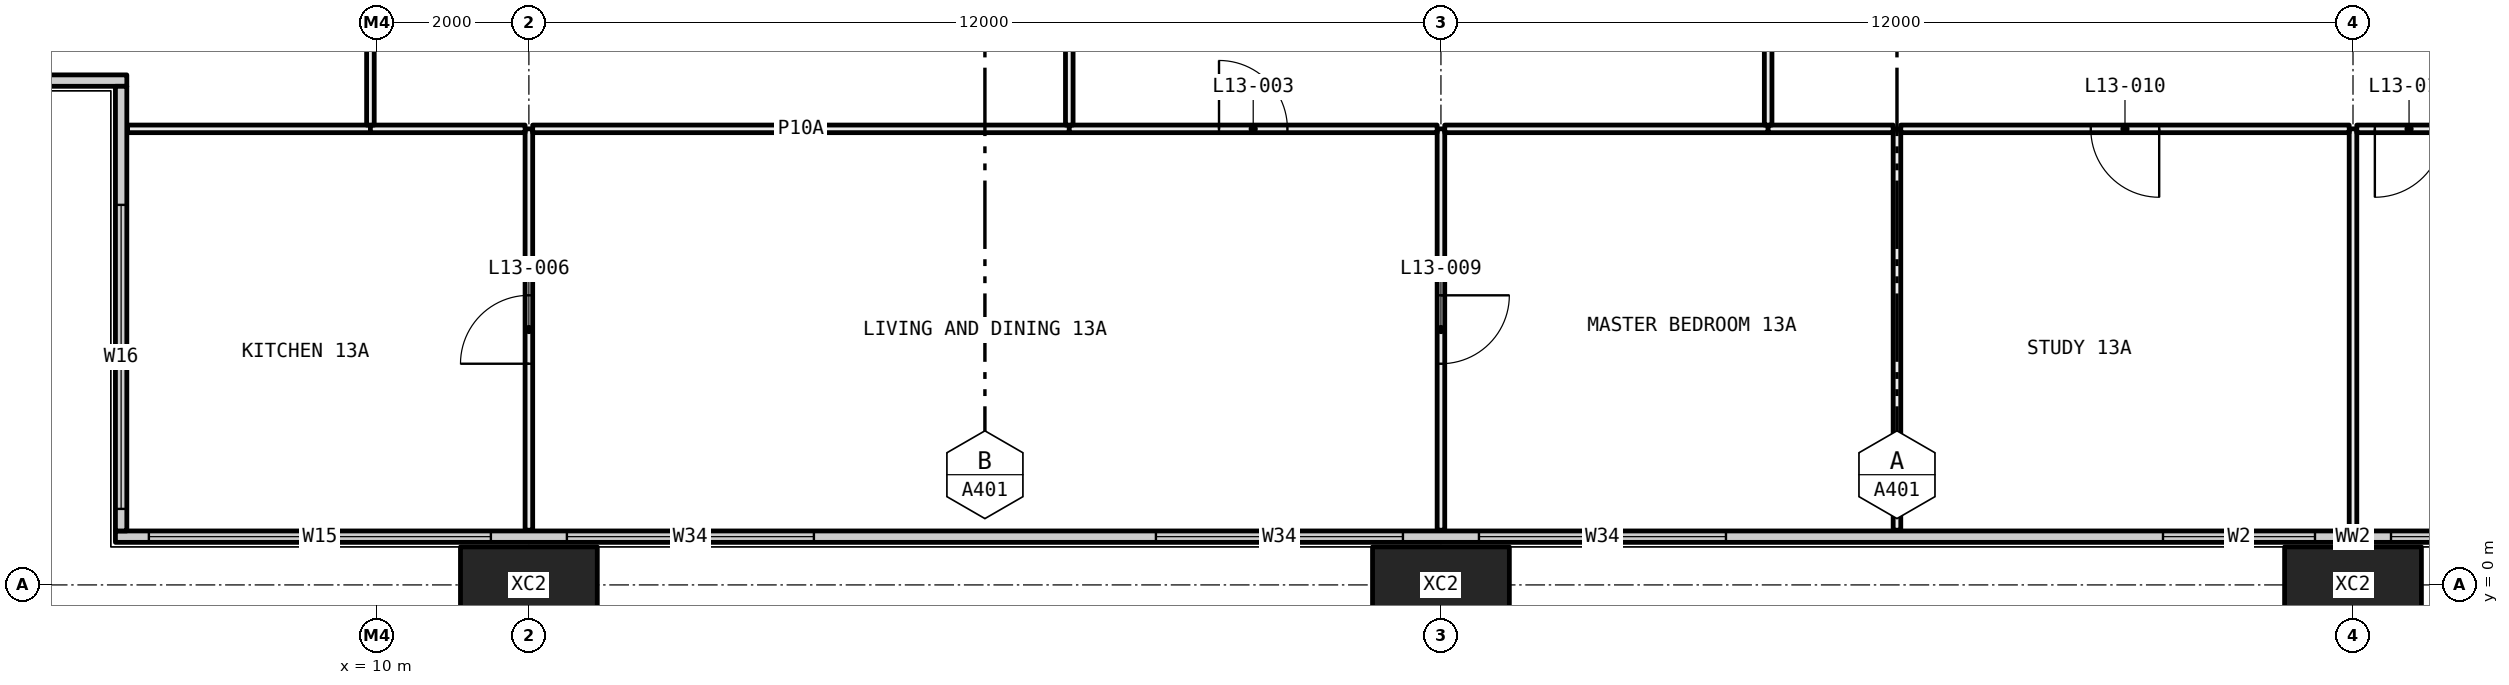
"""IFC4 building model, lengths in metres.
Left out: names, types, materials, properties, quantities, classifications, styles, units other than length and angle.
Written with IfcOpenShell. Run it as: python <this file> out.ifc"""

import sys

from ifc_helpers import new_model, si_unit, direction, frame, frame_2d, origin, origin_2d, place, context, subcontext, project, spatial, rectangle, hollow_rectangle, extrude, element, fill, save


model = new_model("IFC4")
c1 = context("Model", 3, precision=1e-05, world=origin(), true_north=direction((0.0, 1.0)))
c2 = subcontext(c1, "Body", "Model", "MODEL_VIEW")
j1 = project(units=[si_unit("LENGTHUNIT", "METRE"), si_unit("PLANEANGLEUNIT", "RADIAN")], contexts=[c1])
p1 = place(None, origin())
s1 = spatial("IfcSite", under=j1, at=p1, CompositionType="ELEMENT")
p2 = place(p1, origin())
s2 = spatial("IfcBuilding", under=s1, at=p2, CompositionType="ELEMENT")
p3 = place(p2, frame((0.0, 0.0, 57.6)))
s3 = spatial("IfcBuildingStorey", under=s2, at=p3, CompositionType="ELEMENT", Elevation=57.6)
for number, where, z_axis, x_axis in (
    (1, (12.0, 0.0, -0.4), (0.0, 0.0, 1.0), (1.0, 0.0, 0.0)),
    (2, (24.0, 0.0, -0.4), (0.0, 0.0, 1.0), (1.0, 0.0, 0.0)),
    (3, (36.0, 0.0, -0.4), (0.0, 0.0, 1.0), (1.0, 0.0, 0.0)),
):
    element("IfcColumn", number, at=place(p3, frame(where, z_axis=z_axis, x_axis=x_axis)), inside=s3, PredefinedType="COLUMN", context=c2, shape_type="SweptSolid", body=[
        extrude(hollow_rectangle(XDim=1.8, YDim=1.0, WallThickness=0.07, at=origin_2d()), origin(), (0.0, 0.0, 1.0), 3.45),
    ])
p4 = place(p3, frame((6.56, 0.635, 0.0), z_axis=(0.0, 0.0, 1.0), x_axis=(1.0, 0.0, 0.0)))
e4 = element("IfcWall", 4, at=p4, inside=s3, PredefinedType="ELEMENTEDWALL", context=c2, shape_type="SweptSolid", body=[
    extrude(rectangle(XDim=58.88, YDim=0.15, at=frame_2d((29.44, 0.0))), origin(), (0.0, 0.0, 1.0), 3.05),
])
p5 = place(p4, frame((0.44, 0.0, 0.45)))
e5 = element("IfcOpeningElement", 5, at=p5, cuts=e4, PredefinedType="OPENING", context=c2, shape_type="SweptSolid", body=[
    extrude(rectangle(XDim=4.5, YDim=2.55, at=frame_2d((2.25, 1.275))), frame((0.0, 0.085, 0.0), z_axis=(0.0, -1.0, 0.0), x_axis=(1.0, 0.0, 0.0)), (0.0, 0.0, 1.0), 0.17),
])
p6 = place(p4, frame((5.94, 0.0, 0.45)))
e6 = element("IfcOpeningElement", 6, at=p6, cuts=e4, PredefinedType="OPENING", context=c2, shape_type="SweptSolid", body=[
    extrude(rectangle(XDim=3.25, YDim=2.55, at=frame_2d((1.625, 1.275))), frame((0.0, 0.085, 0.0), z_axis=(0.0, -1.0, 0.0), x_axis=(1.0, 0.0, 0.0)), (0.0, 0.0, 1.0), 0.17),
])
p7 = place(p4, frame((13.69, 0.0, 0.45)))
e7 = element("IfcOpeningElement", 7, at=p7, cuts=e4, PredefinedType="OPENING", context=c2, shape_type="SweptSolid", body=[
    extrude(rectangle(XDim=3.25, YDim=2.55, at=frame_2d((1.625, 1.275))), frame((0.0, 0.085, 0.0), z_axis=(0.0, -1.0, 0.0), x_axis=(1.0, 0.0, 0.0)), (0.0, 0.0, 1.0), 0.17),
])
p8 = place(p4, frame((17.94, 0.0, 0.45)))
e8 = element("IfcOpeningElement", 8, at=p8, cuts=e4, PredefinedType="OPENING", context=c2, shape_type="SweptSolid", body=[
    extrude(rectangle(XDim=3.25, YDim=2.55, at=frame_2d((1.625, 1.275))), frame((0.0, 0.085, 0.0), z_axis=(0.0, -1.0, 0.0), x_axis=(1.0, 0.0, 0.0)), (0.0, 0.0, 1.0), 0.17),
])
p9 = place(p4, frame((26.94, 0.0, 0.45)))
e9 = element("IfcOpeningElement", 9, at=p9, cuts=e4, PredefinedType="OPENING", context=c2, shape_type="SweptSolid", body=[
    extrude(rectangle(XDim=2.0, YDim=2.55, at=frame_2d((1.0, 1.275))), frame((0.0, 0.085, 0.0), z_axis=(0.0, -1.0, 0.0), x_axis=(1.0, 0.0, 0.0)), (0.0, 0.0, 1.0), 0.17),
])
p10 = place(p4, frame((29.94, 0.0, 0.45)))
e10 = element("IfcOpeningElement", 10, at=p10, cuts=e4, PredefinedType="OPENING", context=c2, shape_type="SweptSolid", body=[
    extrude(rectangle(XDim=3.25, YDim=2.55, at=frame_2d((1.625, 1.275))), frame((0.0, 0.085, 0.0), z_axis=(0.0, -1.0, 0.0), x_axis=(1.0, 0.0, 0.0)), (0.0, 0.0, 1.0), 0.17),
])
p11 = place(p4, frame((37.69, 0.0, 0.45)))
e11 = element("IfcOpeningElement", 11, at=p11, cuts=e4, PredefinedType="OPENING", context=c2, shape_type="SweptSolid", body=[
    extrude(rectangle(XDim=3.25, YDim=2.55, at=frame_2d((1.625, 1.275))), frame((0.0, 0.085, 0.0), z_axis=(0.0, -1.0, 0.0), x_axis=(1.0, 0.0, 0.0)), (0.0, 0.0, 1.0), 0.17),
])
p12 = place(p4, frame((41.94, 0.0, 0.45)))
e12 = element("IfcOpeningElement", 12, at=p12, cuts=e4, PredefinedType="OPENING", context=c2, shape_type="SweptSolid", body=[
    extrude(rectangle(XDim=3.25, YDim=2.55, at=frame_2d((1.625, 1.275))), frame((0.0, 0.085, 0.0), z_axis=(0.0, -1.0, 0.0), x_axis=(1.0, 0.0, 0.0)), (0.0, 0.0, 1.0), 0.17),
])
p13 = place(p4, frame((50.94, 0.0, 0.45)))
e13 = element("IfcOpeningElement", 13, at=p13, cuts=e4, PredefinedType="OPENING", context=c2, shape_type="SweptSolid", body=[
    extrude(rectangle(XDim=2.0, YDim=2.55, at=frame_2d((1.0, 1.275))), frame((0.0, 0.085, 0.0), z_axis=(0.0, -1.0, 0.0), x_axis=(1.0, 0.0, 0.0)), (0.0, 0.0, 1.0), 0.17),
])
p14 = place(p4, frame((53.94, 0.0, 0.45)))
e14 = element("IfcOpeningElement", 14, at=p14, cuts=e4, PredefinedType="OPENING", context=c2, shape_type="SweptSolid", body=[
    extrude(rectangle(XDim=4.5, YDim=2.55, at=frame_2d((2.25, 1.275))), frame((0.0, 0.085, 0.0), z_axis=(0.0, -1.0, 0.0), x_axis=(1.0, 0.0, 0.0)), (0.0, 0.0, 1.0), 0.17),
])
p15 = place(p3, frame((0.56, 6.635, 0.0), z_axis=(0.0, 0.0, 1.0), x_axis=(1.0, 0.0, 0.0)))
e15 = element("IfcWall", 15, at=p15, inside=s3, PredefinedType="ELEMENTEDWALL", context=c2, shape_type="SweptSolid", body=[
    extrude(rectangle(XDim=6.15, YDim=0.15, at=frame_2d((3.075, 0.0))), origin(), (0.0, 0.0, 1.0), 3.05),
])
p16 = place(p15, frame((0.44, 0.0, 0.45)))
e16 = element("IfcOpeningElement", 16, at=p16, cuts=e15, PredefinedType="OPENING", context=c2, shape_type="SweptSolid", body=[
    extrude(rectangle(XDim=4.0, YDim=2.55, at=frame_2d((2.0, 1.275))), frame((0.0, 0.085, 0.0), z_axis=(0.0, -1.0, 0.0), x_axis=(1.0, 0.0, 0.0)), (0.0, 0.0, 1.0), 0.17),
])
p17 = place(p3, frame((6.635, 0.71, 0.0), z_axis=(0.0, 0.0, 1.0), x_axis=(0.0, 1.0, 0.0)))
e17 = element("IfcWall", 17, at=p17, inside=s3, PredefinedType="ELEMENTEDWALL", context=c2, shape_type="SweptSolid", body=[
    extrude(rectangle(XDim=5.85, YDim=0.15, at=frame_2d((2.925, 0.0))), origin(), (0.0, 0.0, 1.0), 3.05),
])
p18 = place(p17, frame((0.29, 0.0, 0.45)))
e18 = element("IfcOpeningElement", 18, at=p18, cuts=e17, PredefinedType="OPENING", context=c2, shape_type="SweptSolid", body=[
    extrude(rectangle(XDim=4.0, YDim=2.55, at=frame_2d((2.0, 1.275))), frame((0.0, 0.085, 0.0), z_axis=(0.0, -1.0, 0.0), x_axis=(1.0, 0.0, 0.0)), (0.0, 0.0, 1.0), 0.17),
])
p19 = place(p3, frame((12.0, 0.72, 0.0), z_axis=(0.0, 0.0, 1.0), x_axis=(0.0, 1.0, 0.0)))
e19 = element("IfcWall", 19, at=p19, inside=s3, PredefinedType="PARTITIONING", context=c2, shape_type="SweptSolid", body=[
    extrude(rectangle(XDim=5.28, YDim=0.1, at=frame_2d((2.64, 0.0))), origin(), (0.0, 0.0, 1.0), 2.45),
])
p20 = place(p19, frame((2.19, 0.0, 0.0)))
e20 = element("IfcOpeningElement", 20, at=p20, cuts=e19, PredefinedType="OPENING", context=c2, shape_type="SweptSolid", body=[
    extrude(rectangle(XDim=0.9, YDim=2.1, at=frame_2d((0.45, 1.05))), frame((0.0, 0.06, 0.0), z_axis=(0.0, -1.0, 0.0), x_axis=(1.0, 0.0, 0.0)), (0.0, 0.0, 1.0), 0.12),
])
p21 = place(p3, frame((9.915, 6.0, 0.0), z_axis=(0.0, 0.0, 1.0), x_axis=(-1.0, 0.0, 0.0)))
e21 = element("IfcWall", 21, at=p21, inside=s3, PredefinedType="PARTITIONING", context=c2, shape_type="SweptSolid", body=[
    extrude(rectangle(XDim=3.195, YDim=0.1, at=frame_2d((1.598, 0.0))), origin(), (0.0, 0.0, 1.0), 3.05),
])
p22 = place(p3, frame((11.95, 6.0, 0.0), z_axis=(0.0, 0.0, 1.0), x_axis=(-1.0, 0.0, 0.0)))
e22 = element("IfcWall", 22, at=p22, inside=s3, PredefinedType="PARTITIONING", context=c2, shape_type="SweptSolid", body=[
    extrude(rectangle(XDim=2.035, YDim=0.1, at=frame_2d((1.018, 0.0))), origin(), (0.0, 0.0, 1.0), 2.45),
])
p23 = place(p3, frame((24.0, 0.72, 0.0), z_axis=(0.0, 0.0, 1.0), x_axis=(0.0, 1.0, 0.0)))
e23 = element("IfcWall", 23, at=p23, inside=s3, PredefinedType="PARTITIONING", context=c2, shape_type="SweptSolid", body=[
    extrude(rectangle(XDim=5.28, YDim=0.1, at=frame_2d((2.64, 0.0))), origin(), (0.0, 0.0, 1.0), 2.45),
])
p24 = place(p23, frame((2.19, 0.0, 0.0)))
e24 = element("IfcOpeningElement", 24, at=p24, cuts=e23, PredefinedType="OPENING", context=c2, shape_type="SweptSolid", body=[
    extrude(rectangle(XDim=0.9, YDim=2.1, at=frame_2d((0.45, 1.05))), frame((0.0, 0.06, 0.0), z_axis=(0.0, -1.0, 0.0), x_axis=(1.0, 0.0, 0.0)), (0.0, 0.0, 1.0), 0.12),
])
p25 = place(p3, frame((19.11, 6.0, 0.0), z_axis=(0.0, 0.0, 1.0), x_axis=(-1.0, 0.0, 0.0)))
e25 = element("IfcWall", 25, at=p25, inside=s3, PredefinedType="PARTITIONING", context=c2, shape_type="SweptSolid", body=[
    extrude(rectangle(XDim=7.06, YDim=0.1, at=frame_2d((3.53, 0.0))), origin(), (0.0, 0.0, 1.0), 2.45),
])
p26 = place(p3, frame((23.95, 6.0, 0.0), z_axis=(0.0, 0.0, 1.0), x_axis=(-1.0, 0.0, 0.0)))
e26 = element("IfcWall", 26, at=p26, inside=s3, PredefinedType="PARTITIONING", context=c2, shape_type="SweptSolid", body=[
    extrude(rectangle(XDim=4.84, YDim=0.1, at=frame_2d((2.42, 0.0))), origin(), (0.0, 0.0, 1.0), 2.45),
])
p27 = place(p26, frame((1.97, 0.0, 0.0)))
e27 = element("IfcOpeningElement", 27, at=p27, cuts=e26, PredefinedType="OPENING", context=c2, shape_type="SweptSolid", body=[
    extrude(rectangle(XDim=0.9, YDim=2.1, at=frame_2d((0.45, 1.05))), frame((0.0, 0.06, 0.0), z_axis=(0.0, -1.0, 0.0), x_axis=(1.0, 0.0, 0.0)), (0.0, 0.0, 1.0), 0.12),
])
p28 = place(p3, frame((30.0, 0.72, 0.0), z_axis=(0.0, 0.0, 1.0), x_axis=(0.0, 1.0, 0.0)))
e28 = element("IfcWall", 28, at=p28, inside=s3, PredefinedType="PARTITIONING", context=c2, shape_type="SweptSolid", body=[
    extrude(rectangle(XDim=5.28, YDim=0.1, at=frame_2d((2.64, 0.0))), origin(), (0.0, 0.0, 1.0), 3.05),
])
p29 = place(p3, frame((28.305, 6.0, 0.0), z_axis=(0.0, 0.0, 1.0), x_axis=(-1.0, 0.0, 0.0)))
e29 = element("IfcWall", 29, at=p29, inside=s3, PredefinedType="PARTITIONING", context=c2, shape_type="SweptSolid", body=[
    extrude(rectangle(XDim=4.255, YDim=0.1, at=frame_2d((2.127, 0.0))), origin(), (0.0, 0.0, 1.0), 2.45),
])
p30 = place(p3, frame((29.95, 6.0, 0.0), z_axis=(0.0, 0.0, 1.0), x_axis=(-1.0, 0.0, 0.0)))
e30 = element("IfcWall", 30, at=p30, inside=s3, PredefinedType="PARTITIONING", context=c2, shape_type="SweptSolid", body=[
    extrude(rectangle(XDim=1.645, YDim=0.1, at=frame_2d((0.823, 0.0))), origin(), (0.0, 0.0, 1.0), 3.05),
])
p31 = place(p3, frame((36.0, 0.72, 0.0), z_axis=(0.0, 0.0, 1.0), x_axis=(0.0, 1.0, 0.0)))
e31 = element("IfcWall", 31, at=p31, inside=s3, PredefinedType="PARTITIONING", context=c2, shape_type="SweptSolid", body=[
    extrude(rectangle(XDim=5.28, YDim=0.1, at=frame_2d((2.64, 0.0))), origin(), (0.0, 0.0, 1.0), 2.45),
])
p32 = place(p3, frame((35.95, 6.0, 0.0), z_axis=(0.0, 0.0, 1.0), x_axis=(-1.0, 0.0, 0.0)))
e32 = element("IfcWall", 32, at=p32, inside=s3, PredefinedType="PARTITIONING", context=c2, shape_type="SweptSolid", body=[
    extrude(rectangle(XDim=5.9, YDim=0.1, at=frame_2d((2.95, 0.0))), origin(), (0.0, 0.0, 1.0), 2.45),
])
p33 = place(p32, frame((2.5, 0.0, 0.0)))
e33 = element("IfcOpeningElement", 33, at=p33, cuts=e32, PredefinedType="OPENING", context=c2, shape_type="SweptSolid", body=[
    extrude(rectangle(XDim=0.9, YDim=2.1, at=frame_2d((0.45, 1.05))), frame((0.0, 0.06, 0.0), z_axis=(0.0, -1.0, 0.0), x_axis=(1.0, 0.0, 0.0)), (0.0, 0.0, 1.0), 0.12),
])
p34 = place(p3, frame((37.425, 6.0, 0.0), z_axis=(0.0, 0.0, 1.0), x_axis=(-1.0, 0.0, 0.0)))
e34 = element("IfcWall", 34, at=p34, inside=s3, PredefinedType="PARTITIONING", context=c2, shape_type="SweptSolid", body=[
    extrude(rectangle(XDim=1.375, YDim=0.1, at=frame_2d((0.688, 0.0))), origin(), (0.0, 0.0, 1.0), 2.45),
])
p35 = place(p34, frame((0.238, 0.0, 0.0)))
e35 = element("IfcOpeningElement", 35, at=p35, cuts=e34, PredefinedType="OPENING", context=c2, shape_type="SweptSolid", body=[
    extrude(rectangle(XDim=0.9, YDim=2.1, at=frame_2d((0.45, 1.05))), frame((0.0, 0.06, 0.0), z_axis=(0.0, -1.0, 0.0), x_axis=(1.0, 0.0, 0.0)), (0.0, 0.0, 1.0), 0.12),
])
p36 = place(p3, frame((9.915, 6.05, 0.0), z_axis=(0.0, 0.0, 1.0), x_axis=(0.0, 1.0, 0.0)))
e36 = element("IfcWall", 36, at=p36, inside=s3, PredefinedType="PARTITIONING", context=c2, shape_type="SweptSolid", body=[
    extrude(rectangle(XDim=5.875, YDim=0.1, at=frame_2d((2.938, 0.0))), origin(), (0.0, 0.0, 1.0), 2.45),
])
p37 = place(p36, frame((2.488, 0.0, 0.0)))
e37 = element("IfcOpeningElement", 37, at=p37, cuts=e36, PredefinedType="OPENING", context=c2, shape_type="SweptSolid", body=[
    extrude(rectangle(XDim=0.9, YDim=2.1, at=frame_2d((0.45, 1.05))), frame((0.0, 0.06, 0.0), z_axis=(0.0, -1.0, 0.0), x_axis=(1.0, 0.0, 0.0)), (0.0, 0.0, 1.0), 0.12),
])
p38 = place(p3, frame((19.11, 6.05, 0.0), z_axis=(0.0, 0.0, 1.0), x_axis=(0.0, 1.0, 0.0)))
e38 = element("IfcWall", 38, at=p38, inside=s3, PredefinedType="PARTITIONING", context=c2, shape_type="SweptSolid", body=[
    extrude(rectangle(XDim=5.95, YDim=0.1, at=frame_2d((2.975, 0.0))), origin(), (0.0, 0.0, 1.0), 2.45),
])
p39 = place(p38, frame((2.525, 0.0, 0.0)))
e39 = element("IfcOpeningElement", 39, at=p39, cuts=e38, PredefinedType="OPENING", context=c2, shape_type="SweptSolid", body=[
    extrude(rectangle(XDim=0.9, YDim=2.1, at=frame_2d((0.45, 1.05))), frame((0.0, 0.06, 0.0), z_axis=(0.0, -1.0, 0.0), x_axis=(1.0, 0.0, 0.0)), (0.0, 0.0, 1.0), 0.12),
])
p40 = place(p3, frame((28.305, 6.05, 0.0), z_axis=(0.0, 0.0, 1.0), x_axis=(0.0, 1.0, 0.0)))
e40 = element("IfcWall", 40, at=p40, inside=s3, PredefinedType="PARTITIONING", context=c2, shape_type="SweptSolid", body=[
    extrude(rectangle(XDim=5.95, YDim=0.1, at=frame_2d((2.975, 0.0))), origin(), (0.0, 0.0, 1.0), 2.45),
])
p41 = place(p40, frame((2.525, 0.0, 0.0)))
e41 = element("IfcOpeningElement", 41, at=p41, cuts=e40, PredefinedType="OPENING", context=c2, shape_type="SweptSolid", body=[
    extrude(rectangle(XDim=0.9, YDim=2.1, at=frame_2d((0.45, 1.05))), frame((0.0, 0.06, 0.0), z_axis=(0.0, -1.0, 0.0), x_axis=(1.0, 0.0, 0.0)), (0.0, 0.0, 1.0), 0.12),
])
p42 = place(p5, origin())
e42 = element("IfcWindow", 42, at=p42, inside=s3, PartitioningType="SINGLE_PANEL", PredefinedType="WINDOW", context=c2, shape_type="SweptSolid", body=[
    extrude(rectangle(XDim=4.5, YDim=2.55, at=frame_2d((2.25, 1.275))), frame((0.0, 0.03, 0.0), z_axis=(0.0, -1.0, 0.0), x_axis=(1.0, 0.0, 0.0)), (0.0, 0.0, 1.0), 0.06),
])
fill(e5, e42)
p43 = place(p6, origin())
e43 = element("IfcWindow", 43, at=p43, inside=s3, PartitioningType="SINGLE_PANEL", PredefinedType="WINDOW", context=c2, shape_type="SweptSolid", body=[
    extrude(rectangle(XDim=3.25, YDim=2.55, at=frame_2d((1.625, 1.275))), frame((0.0, 0.03, 0.0), z_axis=(0.0, -1.0, 0.0), x_axis=(1.0, 0.0, 0.0)), (0.0, 0.0, 1.0), 0.06),
])
fill(e6, e43)
p44 = place(p7, origin())
e44 = element("IfcWindow", 44, at=p44, inside=s3, PartitioningType="SINGLE_PANEL", PredefinedType="WINDOW", context=c2, shape_type="SweptSolid", body=[
    extrude(rectangle(XDim=3.25, YDim=2.55, at=frame_2d((1.625, 1.275))), frame((0.0, 0.03, 0.0), z_axis=(0.0, -1.0, 0.0), x_axis=(1.0, 0.0, 0.0)), (0.0, 0.0, 1.0), 0.06),
])
fill(e7, e44)
p45 = place(p8, origin())
e45 = element("IfcWindow", 45, at=p45, inside=s3, PartitioningType="SINGLE_PANEL", PredefinedType="WINDOW", context=c2, shape_type="SweptSolid", body=[
    extrude(rectangle(XDim=3.25, YDim=2.55, at=frame_2d((1.625, 1.275))), frame((0.0, 0.03, 0.0), z_axis=(0.0, -1.0, 0.0), x_axis=(1.0, 0.0, 0.0)), (0.0, 0.0, 1.0), 0.06),
])
fill(e8, e45)
p46 = place(p9, origin())
e46 = element("IfcWindow", 46, at=p46, inside=s3, PartitioningType="SINGLE_PANEL", PredefinedType="WINDOW", context=c2, shape_type="SweptSolid", body=[
    extrude(rectangle(XDim=2.0, YDim=2.55, at=frame_2d((1.0, 1.275))), frame((0.0, 0.03, 0.0), z_axis=(0.0, -1.0, 0.0), x_axis=(1.0, 0.0, 0.0)), (0.0, 0.0, 1.0), 0.06),
])
fill(e9, e46)
p47 = place(p10, origin())
e47 = element("IfcWindow", 47, at=p47, inside=s3, PartitioningType="SINGLE_PANEL", PredefinedType="WINDOW", context=c2, shape_type="SweptSolid", body=[
    extrude(rectangle(XDim=3.25, YDim=2.55, at=frame_2d((1.625, 1.275))), frame((0.0, 0.03, 0.0), z_axis=(0.0, -1.0, 0.0), x_axis=(1.0, 0.0, 0.0)), (0.0, 0.0, 1.0), 0.06),
])
fill(e10, e47)
p48 = place(p18, origin())
e48 = element("IfcWindow", 48, at=p48, inside=s3, PartitioningType="SINGLE_PANEL", PredefinedType="WINDOW", context=c2, shape_type="SweptSolid", body=[
    extrude(rectangle(XDim=4.0, YDim=2.55, at=frame_2d((2.0, 1.275))), frame((0.0, 0.03, 0.0), z_axis=(0.0, -1.0, 0.0), x_axis=(1.0, 0.0, 0.0)), (0.0, 0.0, 1.0), 0.06),
])
fill(e18, e48)
p49 = place(p27, frame((0.9, 0.0, 0.0), x_axis=(-1.0, 0.0, 0.0)))
e49 = element("IfcDoor", 49, at=p49, inside=s3, OperationType="SINGLE_SWING_RIGHT", PredefinedType="DOOR", context=c2, shape_type="SweptSolid", body=[
    extrude(rectangle(XDim=0.9, YDim=2.1, at=frame_2d((0.45, 1.05))), frame((0.0, 0.025, 0.0), z_axis=(0.0, -1.0, 0.0), x_axis=(1.0, 0.0, 0.0)), (0.0, 0.0, 1.0), 0.05),
])
fill(e27, e49)
p50 = place(p20, origin())
e50 = element("IfcDoor", 50, at=p50, inside=s3, OperationType="SINGLE_SWING_RIGHT", PredefinedType="DOOR", context=c2, shape_type="SweptSolid", body=[
    extrude(rectangle(XDim=0.9, YDim=2.1, at=frame_2d((0.45, 1.05))), frame((0.0, 0.025, 0.0), z_axis=(0.0, -1.0, 0.0), x_axis=(1.0, 0.0, 0.0)), (0.0, 0.0, 1.0), 0.05),
])
fill(e20, e50)
p51 = place(p24, frame((0.9, 0.0, 0.0), x_axis=(-1.0, 0.0, 0.0)))
e51 = element("IfcDoor", 51, at=p51, inside=s3, OperationType="SINGLE_SWING_RIGHT", PredefinedType="DOOR", context=c2, shape_type="SweptSolid", body=[
    extrude(rectangle(XDim=0.9, YDim=2.1, at=frame_2d((0.45, 1.05))), frame((0.0, 0.025, 0.0), z_axis=(0.0, -1.0, 0.0), x_axis=(1.0, 0.0, 0.0)), (0.0, 0.0, 1.0), 0.05),
])
fill(e24, e51)
p52 = place(p33, origin())
e52 = element("IfcDoor", 52, at=p52, inside=s3, OperationType="SINGLE_SWING_RIGHT", PredefinedType="DOOR", context=c2, shape_type="SweptSolid", body=[
    extrude(rectangle(XDim=0.9, YDim=2.1, at=frame_2d((0.45, 1.05))), frame((0.0, 0.025, 0.0), z_axis=(0.0, -1.0, 0.0), x_axis=(1.0, 0.0, 0.0)), (0.0, 0.0, 1.0), 0.05),
])
fill(e33, e52)
p53 = place(p35, origin())
e53 = element("IfcDoor", 53, at=p53, inside=s3, OperationType="SINGLE_SWING_LEFT", PredefinedType="DOOR", context=c2, shape_type="SweptSolid", body=[
    extrude(rectangle(XDim=0.9, YDim=2.1, at=frame_2d((0.45, 1.05))), frame((0.0, 0.025, 0.0), z_axis=(0.0, -1.0, 0.0), x_axis=(1.0, 0.0, 0.0)), (0.0, 0.0, 1.0), 0.05),
])
fill(e35, e53)
save(model, sys.argv[1])
